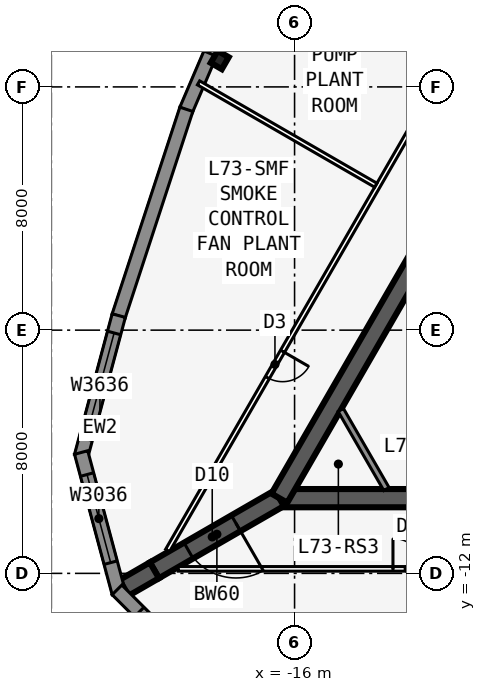
"""IFC4 building model, lengths in metres.
Left out: names, types, materials, properties, quantities, classifications, styles, units other than length and angle.
Written with IfcOpenShell. Run it as: python <this file> out.ifc"""

import sys

from ifc_helpers import new_model, si_unit, direction, frame, frame_2d, origin, origin_2d, place, context, subcontext, project, spatial, polyline, rectangle, i_section, outline, extrude, element, fill, save


model = new_model("IFC4")
c1 = context("Model", 3, precision=1e-05, world=origin(), true_north=direction((0.0, 1.0)))
c2 = subcontext(c1, "Body", "Model", "MODEL_VIEW")
j1 = project(units=[si_unit("LENGTHUNIT", "METRE"), si_unit("PLANEANGLEUNIT", "RADIAN")], contexts=[c1])
p1 = place(None, origin())
s1 = spatial("IfcSite", under=j1, at=p1, CompositionType="ELEMENT")
p2 = place(p1, origin())
s2 = spatial("IfcBuilding", under=s1, at=p2, CompositionType="ELEMENT")
p3 = place(p2, frame((0.0, 0.0, 275.3)))
s3 = spatial("IfcBuildingStorey", under=s2, at=p3, CompositionType="ELEMENT", Elevation=275.3)
p4 = place(p3, frame((-16.5, -9.526, 0.0), z_axis=(0.0, 0.0, 1.0), x_axis=(1.0, 0.0, 0.0)))
e1 = element("IfcWall", 1, at=p4, inside=s3, PredefinedType="SHEAR", context=c2, shape_type="SweptSolid", body=[
    extrude(rectangle(XDim=16.5, YDim=0.6, at=frame_2d((8.25, 0.0))), origin(), (0.0, 0.0, 1.0), 6.0),
])
p5 = place(p4, frame((14.05, 0.0, 0.0)))
e2 = element("IfcOpeningElement", 2, at=p5, cuts=e1, PredefinedType="OPENING", context=c2, shape_type="SweptSolid", body=[
    extrude(rectangle(XDim=1.8, YDim=2.13, at=frame_2d((0.9, 1.065))), frame((0.0, 0.31, 0.0), z_axis=(0.0, -1.0, 0.0), x_axis=(1.0, 0.0, 0.0)), (0.0, 0.0, 1.0), 0.62),
])
p6 = place(p3, frame((-8.25, 4.763, 0.0), z_axis=(0.0, 0.0, 1.0), x_axis=(-0.499996545922, -0.866027397988, 0.0)))
e3 = element("IfcWall", 3, at=p6, inside=s3, PredefinedType="SHEAR", context=c2, shape_type="SweptSolid", body=[
    extrude(rectangle(XDim=16.5, YDim=0.6, at=frame_2d((8.25, 0.0))), origin(), (0.0, 0.0, 1.0), 6.0),
])
p7 = place(p3, frame((-16.5, -9.526, 0.0), z_axis=(0.0, 0.0, 1.0), x_axis=(-0.866031398331, -0.499989616998, 0.0)))
e4 = element("IfcWall", 4, at=p7, inside=s3, PredefinedType="SHEAR", context=c2, shape_type="SweptSolid", body=[
    extrude(rectangle(XDim=4.746, YDim=0.6, at=frame_2d((2.373, 0.0))), origin(), (0.0, 0.0, 1.0), 6.0),
])
p8 = place(p7, frame((1.65, 0.0, 0.0)))
e5 = element("IfcOpeningElement", 5, at=p8, cuts=e4, PredefinedType="OPENING", context=c2, shape_type="SweptSolid", body=[
    extrude(rectangle(XDim=1.8, YDim=2.13, at=frame_2d((0.9, 1.065))), frame((0.0, 0.31, 0.0), z_axis=(0.0, -1.0, 0.0), x_axis=(1.0, 0.0, 0.0)), (0.0, 0.0, 1.0), 0.62),
])
p9 = place(p3, frame((-20.61, -11.899, 0.0), z_axis=(0.0, 0.0, 1.0), x_axis=(-0.866009537788, -0.500027479704, 0.0)))
e6 = element("IfcWall", 6, at=p9, inside=s3, PredefinedType="SHEAR", context=c2, shape_type="SweptSolid", body=[
    extrude(rectangle(XDim=1.155, YDim=0.6, at=frame_2d((0.577, 0.0))), origin(), (0.0, 0.0, 1.0), 6.0),
])
p10 = place(p3, frame((-8.25, 4.763, 0.0), z_axis=(0.0, 0.0, 1.0), x_axis=(-0.866023543838, 0.500003221507, 0.0)))
e7 = element("IfcWall", 7, at=p10, inside=s3, PredefinedType="SHEAR", context=c2, shape_type="SweptSolid", body=[
    extrude(rectangle(XDim=8.154, YDim=0.9, at=frame_2d((4.077, 0.0))), origin(), (0.0, 0.0, 1.0), 6.0),
])
p11 = place(p3, frame((-18.461, 4.885, 0.0), z_axis=(0.0, 0.0, 1.0), x_axis=(-0.866025403784, 0.5, 0.0)))
e8 = element("IfcColumn", 8, at=p11, inside=s3, PredefinedType="COLUMN", context=c2, shape_type="SweptSolid", body=[
    extrude(i_section(OverallWidth=0.419, OverallDepth=0.455, WebThickness=0.042, FlangeThickness=0.068, at=origin_2d()), origin(), (0.0, 0.0, 1.0), 6.0),
])
p12 = place(p3, frame((-13.786, 13.733, 0.0), z_axis=(0.0, 0.0, 1.0), x_axis=(-0.499993662806, -0.866029062534, 0.0)))
e9 = element("IfcWall", 9, at=p12, inside=s3, PredefinedType="SOLIDWALL", context=c2, shape_type="SweptSolid", body=[
    extrude(outline(polyline([(0.0, 0.0), (10.0, 0.0), (10.0, 5.75), (0.0, 5.75), (0.0, 0.0)]), holes=[polyline([(7.25, 2.875), (7.173, 3.457), (6.948, 4.0), (6.591, 4.466), (6.125, 4.823), (5.583, 5.048), (5.0, 5.125), (4.418, 5.048), (3.875, 4.823), (3.409, 4.466), (3.052, 4.0), (2.827, 3.457), (2.75, 2.875), (2.827, 2.293), (3.052, 1.75), (3.409, 1.284), (3.875, 0.926), (4.418, 0.702), (5.0, 0.625), (5.583, 0.702), (6.125, 0.926), (6.591, 1.284), (6.948, 1.75), (7.173, 2.293), (7.25, 2.875)])]), frame((0.0, 0.225, 0.0), z_axis=(0.0, -1.0, 0.0), x_axis=(1.0, 0.0, 0.0)), (0.0, 0.0, 1.0), 0.45),
])
p13 = place(p3, frame((-18.774, 5.097, 0.0), z_axis=(0.0, 0.0, 1.0), x_axis=(-0.393290226175, -0.91941437774, 0.0)))
e10 = element("IfcWall", 10, at=p13, inside=s3, PredefinedType="SOLIDWALL", context=c2, shape_type="SweptSolid", body=[
    extrude(rectangle(XDim=2.014, YDim=0.45, at=frame_2d((1.007, 0.0))), origin(), (0.0, 0.0, 1.0), 5.75),
])
p14 = place(p3, frame((-19.559, 3.263, 0.0), z_axis=(0.0, 0.0, 1.0), x_axis=(-0.311328857048, -0.95030223759, 0.0)))
e11 = element("IfcWall", 11, at=p14, inside=s3, PredefinedType="SOLIDWALL", context=c2, shape_type="SweptSolid", body=[
    extrude(outline(polyline([(0.0, 0.0), (7.153, 0.0), (7.153, 5.75), (0.0, 5.75), (0.0, 0.0)]), holes=[polyline([(5.826, 2.875), (5.75, 3.457), (5.525, 4.0), (5.167, 4.466), (4.701, 4.823), (4.159, 5.048), (3.576, 5.125), (2.994, 5.048), (2.451, 4.823), (1.985, 4.466), (1.628, 4.0), (1.403, 3.457), (1.326, 2.875), (1.403, 2.293), (1.628, 1.75), (1.985, 1.284), (2.451, 0.926), (2.994, 0.702), (3.576, 0.625), (4.159, 0.702), (4.701, 0.926), (5.167, 1.284), (5.525, 1.75), (5.75, 2.293), (5.826, 2.875)])]), frame((0.0, 0.225, 0.0), z_axis=(0.0, -1.0, 0.0), x_axis=(1.0, 0.0, 0.0)), (0.0, 0.0, 1.0), 0.45),
])
p15 = place(p3, frame((-21.783, -3.522, 0.0), z_axis=(0.0, 0.0, 1.0), x_axis=(-0.25880328844, -0.965930048136, 0.0)))
e12 = element("IfcWall", 12, at=p15, inside=s3, PredefinedType="SOLIDWALL", context=c2, shape_type="SweptSolid", body=[
    extrude(rectangle(XDim=4.782, YDim=0.45, at=frame_2d((2.391, 0.0))), origin(), (0.0, 0.0, 1.0), 5.75),
])
p16 = place(p15, frame((0.591, 0.0, 0.9)))
e13 = element("IfcOpeningElement", 13, at=p16, cuts=e12, PredefinedType="OPENING", context=c2, shape_type="SweptSolid", body=[
    extrude(rectangle(XDim=3.6, YDim=3.6, at=frame_2d((1.8, 1.8))), frame((0.0, 0.235, 0.0), z_axis=(0.0, -1.0, 0.0), x_axis=(1.0, 0.0, 0.0)), (0.0, 0.0, 1.0), 0.47),
])
p17 = place(p3, frame((-23.02, -8.025, 0.0), z_axis=(0.0, 0.0, 1.0), x_axis=(0.25880328844, -0.965930048136, 0.0)))
e14 = element("IfcWall", 14, at=p17, inside=s3, PredefinedType="SOLIDWALL", context=c2, shape_type="SweptSolid", body=[
    extrude(outline(polyline([(4.782, 0.225), (4.722, 0.225), (4.375, 0.132), (4.351, 0.225), (0.0, 0.225), (0.0, -0.225), (4.782, -0.225), (4.782, 0.225)])), origin(), (0.0, 0.0, 1.0), 5.75),
])
p18 = place(p17, frame((0.75, 0.0, 0.9)))
e15 = element("IfcOpeningElement", 15, at=p18, cuts=e14, PredefinedType="OPENING", context=c2, shape_type="SweptSolid", body=[
    extrude(rectangle(XDim=3.0, YDim=3.6, at=frame_2d((1.5, 1.8))), frame((0.0, 0.235, 0.0), z_axis=(0.0, -1.0, 0.0), x_axis=(1.0, 0.0, 0.0)), (0.0, 0.0, 1.0), 0.47),
])
p19 = place(p3, frame((-21.841, -12.542, 0.0), z_axis=(0.0, 0.0, 1.0), x_axis=(0.707081252484, -0.707132308968, 0.0)))
e16 = element("IfcWall", 16, at=p19, inside=s3, PredefinedType="SOLIDWALL", context=c2, shape_type="SweptSolid", body=[
    extrude(outline(polyline([(4.782, 0.225), (0.431, 0.225), (0.406, 0.132), (0.059, 0.225), (0.0, 0.225), (0.0, -0.225), (4.782, -0.225), (4.782, 0.225)])), origin(), (0.0, 0.0, 1.0), 5.75),
])
p20 = place(p19, frame((1.031, 0.0, 0.9)))
e17 = element("IfcOpeningElement", 17, at=p20, cuts=e16, PredefinedType="OPENING", context=c2, shape_type="SweptSolid", body=[
    extrude(rectangle(XDim=3.0, YDim=3.6, at=frame_2d((1.5, 1.8))), frame((0.0, 0.235, 0.0), z_axis=(0.0, -1.0, 0.0), x_axis=(1.0, 0.0, 0.0)), (0.0, 0.0, 1.0), 0.47),
])
p21 = place(p3, frame((-19.827, -11.851, 0.0), z_axis=(0.0, 0.0, 1.0), x_axis=(1.0, 0.0, 0.0)))
e18 = element("IfcWall", 18, at=p21, inside=s3, PredefinedType="PARTITIONING", context=c2, shape_type="SweptSolid", body=[
    extrude(rectangle(XDim=39.654, YDim=0.15, at=frame_2d((19.827, 0.0))), origin(), (0.0, 0.0, 1.0), 5.75),
])
p22 = place(p21, frame((7.063, 0.0, 0.0)))
e19 = element("IfcOpeningElement", 19, at=p22, cuts=e18, PredefinedType="OPENING", context=c2, shape_type="SweptSolid", body=[
    extrude(rectangle(XDim=1.0, YDim=2.13, at=frame_2d((0.5, 1.065))), frame((0.0, 0.085, 0.0), z_axis=(0.0, -1.0, 0.0), x_axis=(1.0, 0.0, 0.0)), (0.0, 0.0, 1.0), 0.17),
])
p23 = place(p21, frame((16.827, 0.0, 0.0)))
e20 = element("IfcOpeningElement", 20, at=p23, cuts=e18, PredefinedType="OPENING", context=c2, shape_type="SweptSolid", body=[
    extrude(rectangle(XDim=1.0, YDim=2.13, at=frame_2d((0.5, 1.065))), frame((0.0, 0.085, 0.0), z_axis=(0.0, -1.0, 0.0), x_axis=(1.0, 0.0, 0.0)), (0.0, 0.0, 1.0), 0.17),
])
p24 = place(p21, frame((29.091, 0.0, 0.0)))
e21 = element("IfcOpeningElement", 21, at=p24, cuts=e18, PredefinedType="OPENING", context=c2, shape_type="SweptSolid", body=[
    extrude(rectangle(XDim=1.0, YDim=2.13, at=frame_2d((0.5, 1.065))), frame((0.0, 0.085, 0.0), z_axis=(0.0, -1.0, 0.0), x_axis=(1.0, 0.0, 0.0)), (0.0, 0.0, 1.0), 0.17),
])
p25 = place(p3, frame((-0.35, 23.096, 0.0), z_axis=(0.0, 0.0, 1.0), x_axis=(-0.499998875317, -0.866026053119, 0.0)))
e22 = element("IfcWall", 22, at=p25, inside=s3, PredefinedType="PARTITIONING", context=c2, shape_type="SweptSolid", body=[
    extrude(rectangle(XDim=39.654, YDim=0.15, at=frame_2d((19.827, 0.0))), origin(), (0.0, 0.0, 1.0), 5.75),
])
p26 = place(p25, frame((9.563, 0.0, 0.0)))
e23 = element("IfcOpeningElement", 23, at=p26, cuts=e22, PredefinedType="OPENING", context=c2, shape_type="SweptSolid", body=[
    extrude(rectangle(XDim=1.0, YDim=2.13, at=frame_2d((0.5, 1.065))), frame((0.0, 0.085, 0.0), z_axis=(0.0, -1.0, 0.0), x_axis=(1.0, 0.0, 0.0)), (0.0, 0.0, 1.0), 0.17),
])
p27 = place(p25, frame((22.327, 0.0, 0.0)))
e24 = element("IfcOpeningElement", 24, at=p27, cuts=e22, PredefinedType="OPENING", context=c2, shape_type="SweptSolid", body=[
    extrude(rectangle(XDim=1.0, YDim=2.13, at=frame_2d((0.5, 1.065))), frame((0.0, 0.085, 0.0), z_axis=(0.0, -1.0, 0.0), x_axis=(1.0, 0.0, 0.0)), (0.0, 0.0, 1.0), 0.17),
])
p28 = place(p25, frame((32.091, 0.0, 0.0)))
e25 = element("IfcOpeningElement", 25, at=p28, cuts=e22, PredefinedType="OPENING", context=c2, shape_type="SweptSolid", body=[
    extrude(rectangle(XDim=1.0, YDim=2.13, at=frame_2d((0.5, 1.065))), frame((0.0, 0.085, 0.0), z_axis=(0.0, -1.0, 0.0), x_axis=(1.0, 0.0, 0.0)), (0.0, 0.0, 1.0), 0.17),
])
p29 = place(p3, frame((-13.329, 0.767, 0.0), z_axis=(0.0, 0.0, 1.0), x_axis=(-0.866020720842, 0.500008111007, 0.0)))
e26 = element("IfcWall", 26, at=p29, inside=s3, PredefinedType="PARTITIONING", context=c2, shape_type="SweptSolid", body=[
    extrude(rectangle(XDim=6.732, YDim=0.15, at=frame_2d((3.366, 0.0))), origin(), (0.0, 0.0, 1.0), 5.75),
])
p30 = place(p3, frame((-12.978, -9.226, 0.0), z_axis=(0.0, 0.0, 1.0), x_axis=(-0.499952404951, 0.866052881055, 0.0)))
e27 = element("IfcWall", 27, at=p30, inside=s3, PredefinedType="SOLIDWALL", context=c2, shape_type="SweptSolid", body=[
    extrude(rectangle(XDim=3.002, YDim=0.2, at=frame_2d((1.501, 0.0))), origin(), (0.0, 0.0, 1.0), 5.75),
])
p31 = place(p16, origin())
e28 = element("IfcWindow", 28, at=p31, inside=s3, PartitioningType="SINGLE_PANEL", PredefinedType="WINDOW", context=c2, shape_type="SweptSolid", body=[
    extrude(rectangle(XDim=3.6, YDim=3.6, at=frame_2d((1.8, 1.8))), frame((0.0, 0.03, 0.0), z_axis=(0.0, -1.0, 0.0), x_axis=(1.0, 0.0, 0.0)), (0.0, 0.0, 1.0), 0.06),
])
fill(e13, e28)
p32 = place(p18, origin())
e29 = element("IfcWindow", 29, at=p32, inside=s3, PartitioningType="SINGLE_PANEL", PredefinedType="WINDOW", context=c2, shape_type="SweptSolid", body=[
    extrude(rectangle(XDim=3.0, YDim=3.6, at=frame_2d((1.5, 1.8))), frame((0.0, 0.03, 0.0), z_axis=(0.0, -1.0, 0.0), x_axis=(1.0, 0.0, 0.0)), (0.0, 0.0, 1.0), 0.06),
])
fill(e15, e29)
p33 = place(p20, origin())
e30 = element("IfcWindow", 30, at=p33, inside=s3, PartitioningType="SINGLE_PANEL", PredefinedType="WINDOW", context=c2, shape_type="SweptSolid", body=[
    extrude(rectangle(XDim=3.0, YDim=3.6, at=frame_2d((1.5, 1.8))), frame((0.0, 0.03, 0.0), z_axis=(0.0, -1.0, 0.0), x_axis=(1.0, 0.0, 0.0)), (0.0, 0.0, 1.0), 0.06),
])
fill(e17, e30)
p34 = place(p22, origin())
e31 = element("IfcDoor", 31, at=p34, inside=s3, OperationType="SINGLE_SWING_LEFT", PredefinedType="DOOR", context=c2, shape_type="SweptSolid", body=[
    extrude(rectangle(XDim=1.0, YDim=2.13, at=frame_2d((0.5, 1.065))), frame((0.0, 0.025, 0.0), z_axis=(0.0, -1.0, 0.0), x_axis=(1.0, 0.0, 0.0)), (0.0, 0.0, 1.0), 0.05),
])
fill(e19, e31)
p35 = place(p28, origin())
e32 = element("IfcDoor", 32, at=p35, inside=s3, OperationType="SINGLE_SWING_LEFT", PredefinedType="DOOR", context=c2, shape_type="SweptSolid", body=[
    extrude(rectangle(XDim=1.0, YDim=2.13, at=frame_2d((0.5, 1.065))), frame((0.0, 0.025, 0.0), z_axis=(0.0, -1.0, 0.0), x_axis=(1.0, 0.0, 0.0)), (0.0, 0.0, 1.0), 0.05),
])
fill(e25, e32)
p36 = place(p8, origin())
e33 = element("IfcDoor", 33, at=p36, inside=s3, OperationType="DOUBLE_DOOR_DOUBLE_SWING", PredefinedType="DOOR", context=c2, shape_type="SweptSolid", body=[
    extrude(rectangle(XDim=1.8, YDim=2.13, at=frame_2d((0.9, 1.065))), frame((0.0, 0.025, 0.0), z_axis=(0.0, -1.0, 0.0), x_axis=(1.0, 0.0, 0.0)), (0.0, 0.0, 1.0), 0.05),
])
fill(e5, e33)
save(model, sys.argv[1])
